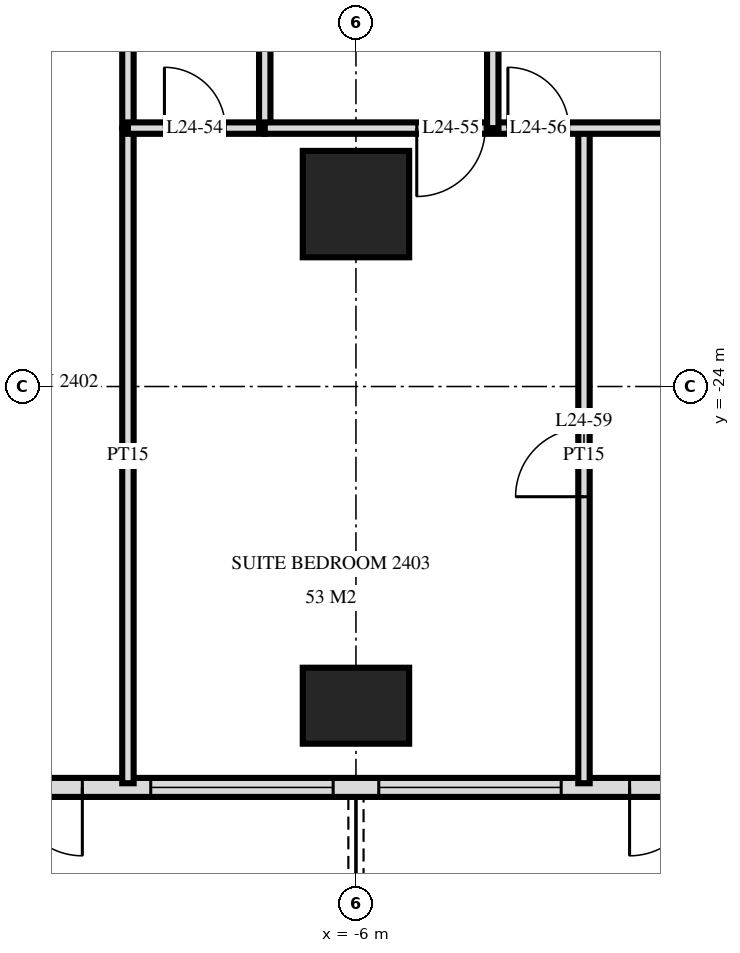
"""IFC4 building model, lengths in metres.
Left out: names, types, materials, properties, quantities, classifications, styles, units other than length and angle.
Written with IfcOpenShell. Run it as: python <this file> out.ifc"""

import sys

from ifc_helpers import new_model, si_unit, direction, frame, frame_2d, origin, origin_2d, place, context, subcontext, project, spatial, rectangle, extrude, element, fill, save


model = new_model("IFC4")
c1 = context("Model", 3, precision=1e-05, world=origin(), true_north=direction((0.0, 1.0)))
c2 = subcontext(c1, "Body", "Model", "MODEL_VIEW")
j1 = project(units=[si_unit("LENGTHUNIT", "METRE"), si_unit("PLANEANGLEUNIT", "RADIAN")], contexts=[c1])
p1 = place(None, origin())
s1 = spatial("IfcSite", under=j1, at=p1, CompositionType="ELEMENT")
p2 = place(p1, origin())
s2 = spatial("IfcBuilding", under=s1, at=p2, CompositionType="ELEMENT")
p3 = place(p2, frame((0.0, 0.0, 96.0)))
s3 = spatial("IfcBuildingStorey", under=s2, at=p3, CompositionType="ELEMENT", Elevation=96.0)
p4 = place(p3, frame((-6.0, -28.2, 0.0), z_axis=(0.0, 0.0, 1.0), x_axis=(1.0, 0.0, 0.0)))
e1 = element("IfcColumn", 1, at=p4, inside=s3, PredefinedType="COLUMN", context=c2, shape_type="SweptSolid", body=[
    extrude(rectangle(XDim=1.4, YDim=1.0, at=origin_2d()), origin(), (0.0, 0.0, 1.0), 3.6),
])
p5 = place(p3, frame((-6.0, -21.6, 0.0), z_axis=(0.0, 0.0, 1.0), x_axis=(1.0, 0.0, 0.0)))
e2 = element("IfcColumn", 2, at=p5, inside=s3, PredefinedType="COLUMN", context=c2, shape_type="SweptSolid", body=[
    extrude(rectangle(XDim=1.4, YDim=1.4, at=origin_2d()), origin(), (0.0, 0.0, 1.0), 3.6),
])
p6 = place(p3, frame((-28.775, -29.275, 0.0), z_axis=(0.0, 0.0, 1.0), x_axis=(1.0, 0.0, 0.0)))
e3 = element("IfcWall", 3, at=p6, inside=s3, PredefinedType="SOLIDWALL", context=c2, shape_type="SweptSolid", body=[
    extrude(rectangle(XDim=57.551, YDim=0.25, at=frame_2d((28.775, 0.0))), origin(), (0.0, 0.0, 1.0), 3.32),
])
p7 = place(p6, frame((0.575, 0.0, 0.0)))
e4 = element("IfcOpeningElement", 4, at=p7, cuts=e3, PredefinedType="OPENING", context=c2, shape_type="SweptSolid", body=[
    extrude(rectangle(XDim=1.8, YDim=2.4, at=frame_2d((0.9, 1.2))), frame((0.0, 0.135, 0.0), z_axis=(0.0, -1.0, 0.0), x_axis=(1.0, 0.0, 0.0)), (0.0, 0.0, 1.0), 0.27),
])
p8 = place(p6, frame((5.075, 0.0, 0.3)))
e5 = element("IfcOpeningElement", 5, at=p8, cuts=e3, PredefinedType="OPENING", context=c2, shape_type="SweptSolid", body=[
    extrude(rectangle(XDim=2.4, YDim=2.1, at=frame_2d((1.2, 1.05))), frame((0.0, 0.135, 0.0), z_axis=(0.0, -1.0, 0.0), x_axis=(1.0, 0.0, 0.0)), (0.0, 0.0, 1.0), 0.27),
])
p9 = place(p6, frame((8.375, 0.0, 0.0)))
e6 = element("IfcOpeningElement", 6, at=p9, cuts=e3, PredefinedType="OPENING", context=c2, shape_type="SweptSolid", body=[
    extrude(rectangle(XDim=1.8, YDim=2.4, at=frame_2d((0.9, 1.2))), frame((0.0, 0.135, 0.0), z_axis=(0.0, -1.0, 0.0), x_axis=(1.0, 0.0, 0.0)), (0.0, 0.0, 1.0), 0.27),
])
p10 = place(p6, frame((11.375, 0.0, 0.0)))
e7 = element("IfcOpeningElement", 7, at=p10, cuts=e3, PredefinedType="OPENING", context=c2, shape_type="SweptSolid", body=[
    extrude(rectangle(XDim=1.8, YDim=2.4, at=frame_2d((0.9, 1.2))), frame((0.0, 0.135, 0.0), z_axis=(0.0, -1.0, 0.0), x_axis=(1.0, 0.0, 0.0)), (0.0, 0.0, 1.0), 0.27),
])
p11 = place(p6, frame((14.075, 0.0, 0.3)))
e8 = element("IfcOpeningElement", 8, at=p11, cuts=e3, PredefinedType="OPENING", context=c2, shape_type="SweptSolid", body=[
    extrude(rectangle(XDim=2.4, YDim=2.1, at=frame_2d((1.2, 1.05))), frame((0.0, 0.135, 0.0), z_axis=(0.0, -1.0, 0.0), x_axis=(1.0, 0.0, 0.0)), (0.0, 0.0, 1.0), 0.27),
])
p12 = place(p6, frame((17.375, 0.0, 0.0)))
e9 = element("IfcOpeningElement", 9, at=p12, cuts=e3, PredefinedType="OPENING", context=c2, shape_type="SweptSolid", body=[
    extrude(rectangle(XDim=1.8, YDim=2.4, at=frame_2d((0.9, 1.2))), frame((0.0, 0.135, 0.0), z_axis=(0.0, -1.0, 0.0), x_axis=(1.0, 0.0, 0.0)), (0.0, 0.0, 1.0), 0.27),
])
p13 = place(p6, frame((20.075, 0.0, 0.3)))
e10 = element("IfcOpeningElement", 10, at=p13, cuts=e3, PredefinedType="OPENING", context=c2, shape_type="SweptSolid", body=[
    extrude(rectangle(XDim=2.4, YDim=2.1, at=frame_2d((1.2, 1.05))), frame((0.0, 0.135, 0.0), z_axis=(0.0, -1.0, 0.0), x_axis=(1.0, 0.0, 0.0)), (0.0, 0.0, 1.0), 0.27),
])
p14 = place(p6, frame((23.075, 0.0, 0.3)))
e11 = element("IfcOpeningElement", 11, at=p14, cuts=e3, PredefinedType="OPENING", context=c2, shape_type="SweptSolid", body=[
    extrude(rectangle(XDim=2.4, YDim=2.1, at=frame_2d((1.2, 1.05))), frame((0.0, 0.135, 0.0), z_axis=(0.0, -1.0, 0.0), x_axis=(1.0, 0.0, 0.0)), (0.0, 0.0, 1.0), 0.27),
])
p15 = place(p6, frame((26.375, 0.0, 0.0)))
e12 = element("IfcOpeningElement", 12, at=p15, cuts=e3, PredefinedType="OPENING", context=c2, shape_type="SweptSolid", body=[
    extrude(rectangle(XDim=1.8, YDim=2.4, at=frame_2d((0.9, 1.2))), frame((0.0, 0.135, 0.0), z_axis=(0.0, -1.0, 0.0), x_axis=(1.0, 0.0, 0.0)), (0.0, 0.0, 1.0), 0.27),
])
p16 = place(p6, frame((29.375, 0.0, 0.0)))
e13 = element("IfcOpeningElement", 13, at=p16, cuts=e3, PredefinedType="OPENING", context=c2, shape_type="SweptSolid", body=[
    extrude(rectangle(XDim=1.8, YDim=2.4, at=frame_2d((0.9, 1.2))), frame((0.0, 0.135, 0.0), z_axis=(0.0, -1.0, 0.0), x_axis=(1.0, 0.0, 0.0)), (0.0, 0.0, 1.0), 0.27),
])
p17 = place(p6, frame((32.075, 0.0, 0.3)))
e14 = element("IfcOpeningElement", 14, at=p17, cuts=e3, PredefinedType="OPENING", context=c2, shape_type="SweptSolid", body=[
    extrude(rectangle(XDim=2.4, YDim=2.1, at=frame_2d((1.2, 1.05))), frame((0.0, 0.135, 0.0), z_axis=(0.0, -1.0, 0.0), x_axis=(1.0, 0.0, 0.0)), (0.0, 0.0, 1.0), 0.27),
])
p18 = place(p6, frame((35.375, 0.0, 0.0)))
e15 = element("IfcOpeningElement", 15, at=p18, cuts=e3, PredefinedType="OPENING", context=c2, shape_type="SweptSolid", body=[
    extrude(rectangle(XDim=1.8, YDim=2.4, at=frame_2d((0.9, 1.2))), frame((0.0, 0.135, 0.0), z_axis=(0.0, -1.0, 0.0), x_axis=(1.0, 0.0, 0.0)), (0.0, 0.0, 1.0), 0.27),
])
p19 = place(p6, frame((38.075, 0.0, 0.3)))
e16 = element("IfcOpeningElement", 16, at=p19, cuts=e3, PredefinedType="OPENING", context=c2, shape_type="SweptSolid", body=[
    extrude(rectangle(XDim=2.4, YDim=2.1, at=frame_2d((1.2, 1.05))), frame((0.0, 0.135, 0.0), z_axis=(0.0, -1.0, 0.0), x_axis=(1.0, 0.0, 0.0)), (0.0, 0.0, 1.0), 0.27),
])
p20 = place(p6, frame((41.075, 0.0, 0.3)))
e17 = element("IfcOpeningElement", 17, at=p20, cuts=e3, PredefinedType="OPENING", context=c2, shape_type="SweptSolid", body=[
    extrude(rectangle(XDim=2.4, YDim=2.1, at=frame_2d((1.2, 1.05))), frame((0.0, 0.135, 0.0), z_axis=(0.0, -1.0, 0.0), x_axis=(1.0, 0.0, 0.0)), (0.0, 0.0, 1.0), 0.27),
])
p21 = place(p6, frame((44.375, 0.0, 0.0)))
e18 = element("IfcOpeningElement", 18, at=p21, cuts=e3, PredefinedType="OPENING", context=c2, shape_type="SweptSolid", body=[
    extrude(rectangle(XDim=1.8, YDim=2.4, at=frame_2d((0.9, 1.2))), frame((0.0, 0.135, 0.0), z_axis=(0.0, -1.0, 0.0), x_axis=(1.0, 0.0, 0.0)), (0.0, 0.0, 1.0), 0.27),
])
p22 = place(p6, frame((47.075, 0.0, 0.3)))
e19 = element("IfcOpeningElement", 19, at=p22, cuts=e3, PredefinedType="OPENING", context=c2, shape_type="SweptSolid", body=[
    extrude(rectangle(XDim=2.4, YDim=2.1, at=frame_2d((1.2, 1.05))), frame((0.0, 0.135, 0.0), z_axis=(0.0, -1.0, 0.0), x_axis=(1.0, 0.0, 0.0)), (0.0, 0.0, 1.0), 0.27),
])
p23 = place(p6, frame((50.375, 0.0, 0.0)))
e20 = element("IfcOpeningElement", 20, at=p23, cuts=e3, PredefinedType="OPENING", context=c2, shape_type="SweptSolid", body=[
    extrude(rectangle(XDim=1.8, YDim=2.4, at=frame_2d((0.9, 1.2))), frame((0.0, 0.135, 0.0), z_axis=(0.0, -1.0, 0.0), x_axis=(1.0, 0.0, 0.0)), (0.0, 0.0, 1.0), 0.27),
])
p24 = place(p6, frame((53.375, 0.0, 0.0)))
e21 = element("IfcOpeningElement", 21, at=p24, cuts=e3, PredefinedType="OPENING", context=c2, shape_type="SweptSolid", body=[
    extrude(rectangle(XDim=1.8, YDim=2.4, at=frame_2d((0.9, 1.2))), frame((0.0, 0.135, 0.0), z_axis=(0.0, -1.0, 0.0), x_axis=(1.0, 0.0, 0.0)), (0.0, 0.0, 1.0), 0.27),
])
p25 = place(p3, frame((-3.0, -29.22, 0.0), z_axis=(0.0, 0.0, 1.0), x_axis=(0.0, 1.0, 0.0)))
e22 = element("IfcWall", 22, at=p25, inside=s3, PredefinedType="PARTITIONING", context=c2, shape_type="SweptSolid", body=[
    extrude(rectangle(XDim=8.62, YDim=0.15, at=frame_2d((4.31, 0.0))), origin(), (0.0, 0.0, 1.0), 3.32),
])
p26 = place(p25, frame((3.77, 0.0, 0.0)))
e23 = element("IfcOpeningElement", 23, at=p26, cuts=e22, PredefinedType="OPENING", context=c2, shape_type="SweptSolid", body=[
    extrude(rectangle(XDim=0.9, YDim=2.1, at=frame_2d((0.45, 1.05))), frame((0.0, 0.085, 0.0), z_axis=(0.0, -1.0, 0.0), x_axis=(1.0, 0.0, 0.0)), (0.0, 0.0, 1.0), 0.17),
])
p27 = place(p3, frame((-4.2, -20.6, 0.0), z_axis=(0.0, 0.0, 1.0), x_axis=(0.0, 1.0, 0.0)))
e24 = element("IfcWall", 24, at=p27, inside=s3, PredefinedType="PARTITIONING", context=c2, shape_type="SweptSolid", body=[
    extrude(rectangle(XDim=3.6, YDim=0.15, at=frame_2d((1.8, 0.0))), origin(), (0.0, 0.0, 1.0), 3.32),
])
p28 = place(p3, frame((-7.2, -20.6, 0.0), z_axis=(0.0, 0.0, 1.0), x_axis=(0.0, 1.0, 0.0)))
e25 = element("IfcWall", 25, at=p28, inside=s3, PredefinedType="PLUMBINGWALL", context=c2, shape_type="SweptSolid", body=[
    extrude(rectangle(XDim=3.6, YDim=0.15, at=frame_2d((1.8, 0.0))), origin(), (0.0, 0.0, 1.0), 3.32),
])
p29 = place(p3, frame((-9.0, -29.22, 0.0), z_axis=(0.0, 0.0, 1.0), x_axis=(0.0, 1.0, 0.0)))
e26 = element("IfcWall", 26, at=p29, inside=s3, PredefinedType="PARTITIONING", context=c2, shape_type="SweptSolid", body=[
    extrude(rectangle(XDim=8.62, YDim=0.15, at=frame_2d((4.31, 0.0))), origin(), (0.0, 0.0, 1.0), 3.32),
])
p30 = place(p3, frame((-9.0, -20.6, 0.0), z_axis=(0.0, 0.0, 1.0), x_axis=(0.0, 1.0, 0.0)))
e27 = element("IfcWall", 27, at=p30, inside=s3, PredefinedType="PLUMBINGWALL", context=c2, shape_type="SweptSolid", body=[
    extrude(rectangle(XDim=3.6, YDim=0.15, at=frame_2d((1.8, 0.0))), origin(), (0.0, 0.0, 1.0), 3.32),
])
p31 = place(p3, frame((-7.2, -20.6, 0.0), z_axis=(0.0, 0.0, 1.0), x_axis=(1.0, 0.0, 0.0)))
e28 = element("IfcWall", 28, at=p31, inside=s3, PredefinedType="PARTITIONING", context=c2, shape_type="SweptSolid", body=[
    extrude(rectangle(XDim=7.8, YDim=0.15, at=frame_2d((3.9, 0.0))), origin(), (0.0, 0.0, 1.0), 3.32),
])
p32 = place(p31, frame((2.0, 0.0, 0.0)))
e29 = element("IfcOpeningElement", 29, at=p32, cuts=e28, PredefinedType="OPENING", context=c2, shape_type="SweptSolid", body=[
    extrude(rectangle(XDim=0.9, YDim=2.1, at=frame_2d((0.45, 1.05))), frame((0.0, 0.085, 0.0), z_axis=(0.0, -1.0, 0.0), x_axis=(1.0, 0.0, 0.0)), (0.0, 0.0, 1.0), 0.17),
])
p33 = place(p31, frame((3.199, 0.0, 0.0)))
e30 = element("IfcOpeningElement", 30, at=p33, cuts=e28, PredefinedType="OPENING", context=c2, shape_type="SweptSolid", body=[
    extrude(rectangle(XDim=0.8, YDim=2.1, at=frame_2d((0.4, 1.05))), frame((0.0, 0.085, 0.0), z_axis=(0.0, -1.0, 0.0), x_axis=(1.0, 0.0, 0.0)), (0.0, 0.0, 1.0), 0.17),
])
p34 = place(p3, frame((-9.0, -20.6, 0.0), z_axis=(0.0, 0.0, 1.0), x_axis=(1.0, 0.0, 0.0)))
e31 = element("IfcWall", 31, at=p34, inside=s3, PredefinedType="PLUMBINGWALL", context=c2, shape_type="SweptSolid", body=[
    extrude(rectangle(XDim=1.8, YDim=0.15, at=frame_2d((0.9, 0.0))), origin(), (0.0, 0.0, 1.0), 3.32),
])
p35 = place(p34, frame((0.48, 0.0, 0.0)))
e32 = element("IfcOpeningElement", 32, at=p35, cuts=e31, PredefinedType="OPENING", context=c2, shape_type="SweptSolid", body=[
    extrude(rectangle(XDim=0.8, YDim=2.1, at=frame_2d((0.4, 1.05))), frame((0.0, 0.085, 0.0), z_axis=(0.0, -1.0, 0.0), x_axis=(1.0, 0.0, 0.0)), (0.0, 0.0, 1.0), 0.17),
])
p36 = place(p12, frame((0.9, 0.0, 0.0), z_axis=(0.0, 0.0, 1.0), x_axis=(-1.0, 0.0, 0.0)))
e33 = element("IfcDoor", 33, at=p36, inside=s3, OperationType="DOUBLE_DOOR_SINGLE_SWING", PredefinedType="DOOR", context=c2, shape_type="SweptSolid", body=[
    extrude(rectangle(XDim=1.8, YDim=2.4, at=frame_2d((0.0, 1.2))), frame((0.0, -0.025, 0.0), z_axis=(0.0, 1.0, 0.0), x_axis=(-1.0, 0.0, 0.0)), (0.0, 0.0, 1.0), 0.05),
])
fill(e9, e33)
p37 = place(p13, origin())
e34 = element("IfcWindow", 34, at=p37, inside=s3, PartitioningType="SINGLE_PANEL", PredefinedType="WINDOW", context=c2, shape_type="SweptSolid", body=[
    extrude(rectangle(XDim=2.4, YDim=2.1, at=frame_2d((1.2, 1.05))), frame((0.0, 0.03, 0.0), z_axis=(0.0, -1.0, 0.0), x_axis=(1.0, 0.0, 0.0)), (0.0, 0.0, 1.0), 0.06),
])
fill(e10, e34)
p38 = place(p14, origin())
e35 = element("IfcWindow", 35, at=p38, inside=s3, PartitioningType="SINGLE_PANEL", PredefinedType="WINDOW", context=c2, shape_type="SweptSolid", body=[
    extrude(rectangle(XDim=2.4, YDim=2.1, at=frame_2d((1.2, 1.05))), frame((0.0, 0.03, 0.0), z_axis=(0.0, -1.0, 0.0), x_axis=(1.0, 0.0, 0.0)), (0.0, 0.0, 1.0), 0.06),
])
fill(e11, e35)
p39 = place(p15, frame((0.9, 0.0, 0.0), z_axis=(0.0, 0.0, 1.0), x_axis=(-1.0, 0.0, 0.0)))
e36 = element("IfcDoor", 36, at=p39, inside=s3, OperationType="DOUBLE_DOOR_SINGLE_SWING", PredefinedType="DOOR", context=c2, shape_type="SweptSolid", body=[
    extrude(rectangle(XDim=1.8, YDim=2.4, at=frame_2d((0.0, 1.2))), frame((0.0, -0.025, 0.0), z_axis=(0.0, 1.0, 0.0), x_axis=(-1.0, 0.0, 0.0)), (0.0, 0.0, 1.0), 0.05),
])
fill(e12, e36)
p40 = place(p35, origin())
e37 = element("IfcDoor", 37, at=p40, inside=s3, OperationType="SINGLE_SWING_RIGHT", PredefinedType="DOOR", context=c2, shape_type="SweptSolid", body=[
    extrude(rectangle(XDim=0.8, YDim=2.1, at=frame_2d((0.4, 1.05))), frame((0.0, 0.025, 0.0), z_axis=(0.0, -1.0, 0.0), x_axis=(1.0, 0.0, 0.0)), (0.0, 0.0, 1.0), 0.05),
])
fill(e32, e37)
p41 = place(p32, frame((0.45, 0.0, 0.0), z_axis=(0.0, 0.0, 1.0), x_axis=(-1.0, 0.0, 0.0)))
e38 = element("IfcDoor", 38, at=p41, inside=s3, OperationType="SINGLE_SWING_LEFT", PredefinedType="DOOR", context=c2, shape_type="SweptSolid", body=[
    extrude(rectangle(XDim=0.9, YDim=2.1, at=frame_2d((0.0, 1.05))), frame((0.0, -0.025, 0.0), z_axis=(0.0, 1.0, 0.0), x_axis=(-1.0, 0.0, 0.0)), (0.0, 0.0, 1.0), 0.05),
])
fill(e29, e38)
p42 = place(p33, origin())
e39 = element("IfcDoor", 39, at=p42, inside=s3, OperationType="SINGLE_SWING_RIGHT", PredefinedType="DOOR", context=c2, shape_type="SweptSolid", body=[
    extrude(rectangle(XDim=0.8, YDim=2.1, at=frame_2d((0.4, 1.05))), frame((0.0, 0.025, 0.0), z_axis=(0.0, -1.0, 0.0), x_axis=(1.0, 0.0, 0.0)), (0.0, 0.0, 1.0), 0.05),
])
fill(e30, e39)
p43 = place(p26, origin())
e40 = element("IfcDoor", 40, at=p43, inside=s3, OperationType="SINGLE_SWING_RIGHT", PredefinedType="DOOR", context=c2, shape_type="SweptSolid", body=[
    extrude(rectangle(XDim=0.9, YDim=2.1, at=frame_2d((0.45, 1.05))), frame((0.0, 0.025, 0.0), z_axis=(0.0, -1.0, 0.0), x_axis=(1.0, 0.0, 0.0)), (0.0, 0.0, 1.0), 0.05),
])
fill(e23, e40)
save(model, sys.argv[1])
